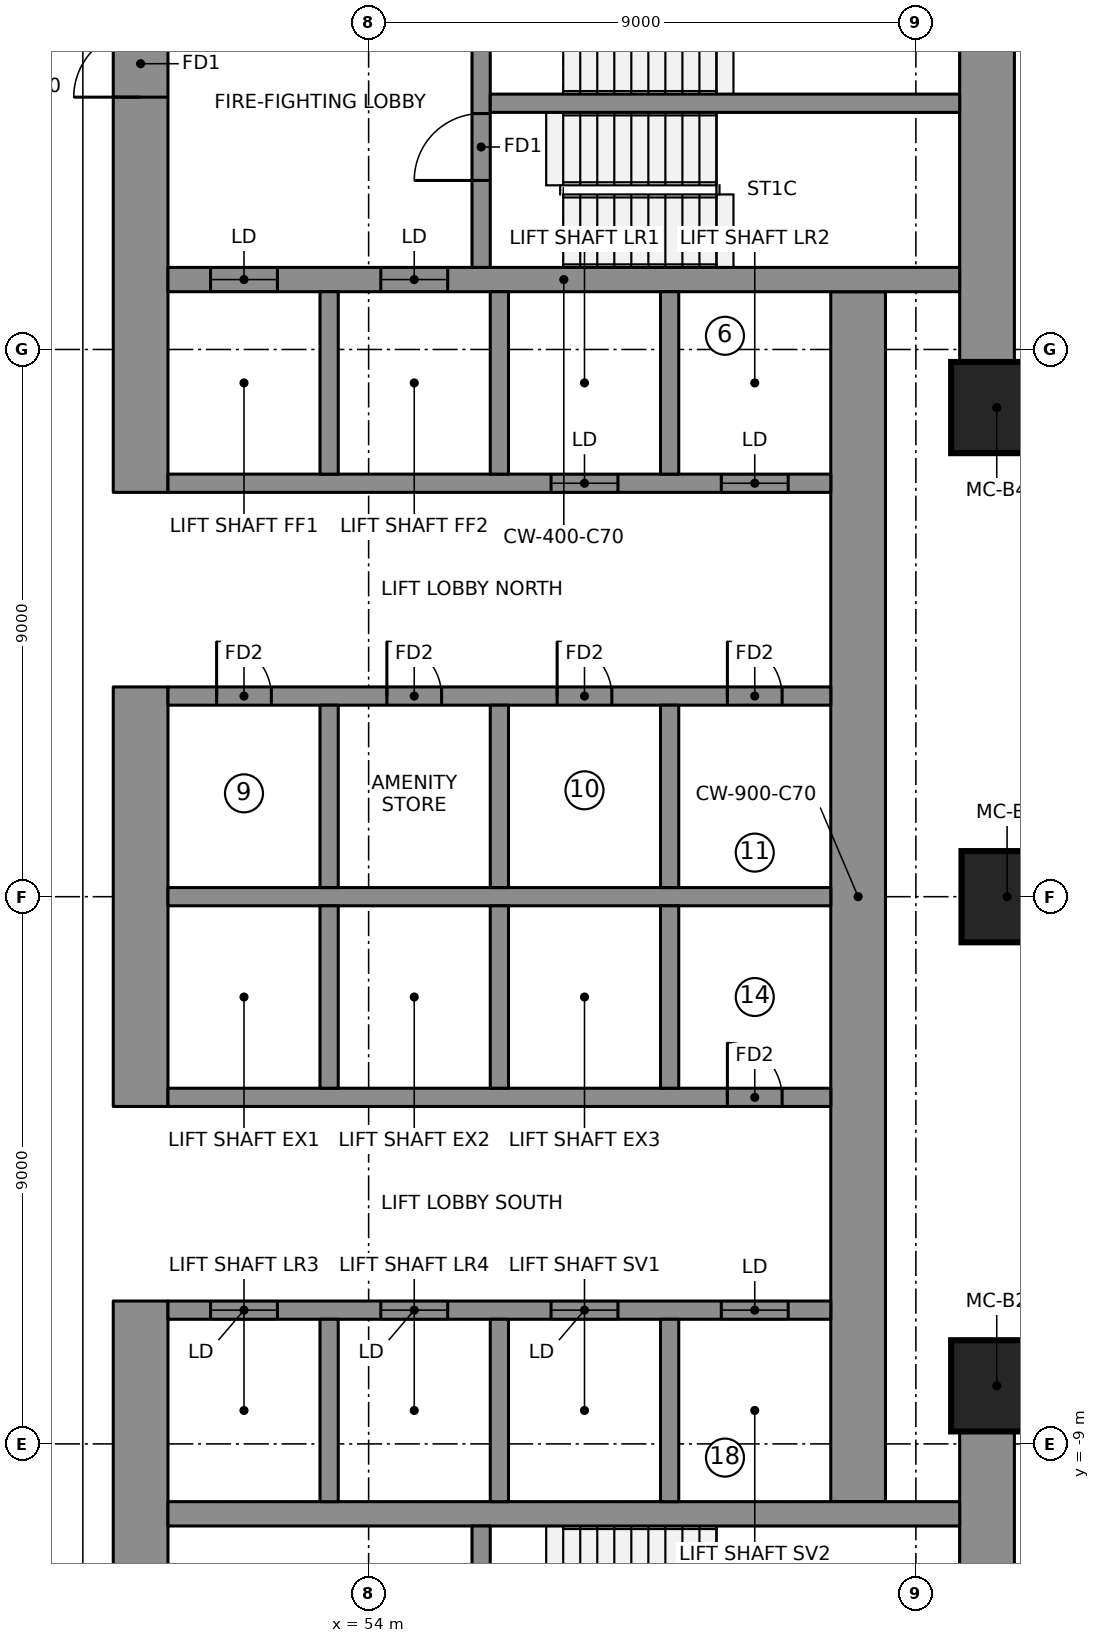
"""IFC4 building model, lengths in metres.
Left out: names, types, materials, properties, quantities, classifications, styles, units other than length and angle.
Written with IfcOpenShell. Run it as: python <this file> out.ifc"""

import sys

from ifc_helpers import new_model, si_unit, direction, frame, frame_2d, origin, origin_2d, place, context, subcontext, project, spatial, rectangle, extrude, element, fill, save


model = new_model("IFC4")
c1 = context("Model", 3, precision=1e-05, world=origin(), true_north=direction((0.0, 1.0)))
c2 = subcontext(c1, "Body", "Model", "MODEL_VIEW")
j1 = project(units=[si_unit("LENGTHUNIT", "METRE"), si_unit("PLANEANGLEUNIT", "RADIAN")], contexts=[c1])
p1 = place(None, origin())
s1 = spatial("IfcSite", under=j1, at=p1, CompositionType="ELEMENT")
p2 = place(p1, origin())
s2 = spatial("IfcBuilding", under=s1, at=p2, CompositionType="ELEMENT")
p3 = place(p2, frame((0.0, 0.0, 155.05)))
s3 = spatial("IfcBuildingStorey", under=s2, at=p3, CompositionType="ELEMENT", Elevation=155.05)
p4 = place(p3, frame((50.25, 6.65, 0.0), z_axis=(0.0, 0.0, 1.0), x_axis=(0.0, 1.0, 0.0)))
e1 = element("IfcWall", 1, at=p4, inside=s3, PredefinedType="SHEAR", context=c2, shape_type="SweptSolid", body=[
    extrude(rectangle(XDim=10.0, YDim=0.9, at=frame_2d((5.0, 0.0))), origin(), (0.0, 0.0, 1.0), 3.55),
])
p5 = place(p4, frame((6.5, 0.0, 0.0)))
e2 = element("IfcOpeningElement", 2, at=p5, cuts=e1, PredefinedType="OPENING", context=c2, shape_type="SweptSolid", body=[
    extrude(rectangle(XDim=1.1, YDim=2.1, at=frame_2d((0.55, 1.05))), frame((0.0, 0.46, 0.0), z_axis=(0.0, -1.0, 0.0), x_axis=(1.0, 0.0, 0.0)), (0.0, 0.0, 1.0), 0.92),
])
p6 = place(p3, frame((50.25, -3.45, 0.0), z_axis=(0.0, 0.0, 1.0), x_axis=(0.0, 1.0, 0.0)))
e3 = element("IfcWall", 3, at=p6, inside=s3, PredefinedType="SHEAR", context=c2, shape_type="SweptSolid", body=[
    extrude(rectangle(XDim=6.9, YDim=0.9, at=frame_2d((3.45, 0.0))), origin(), (0.0, 0.0, 1.0), 3.55),
])
p7 = place(p3, frame((50.25, -16.65, 0.0), z_axis=(0.0, 0.0, 1.0), x_axis=(0.0, 1.0, 0.0)))
e4 = element("IfcWall", 4, at=p7, inside=s3, PredefinedType="SHEAR", context=c2, shape_type="SweptSolid", body=[
    extrude(rectangle(XDim=10.0, YDim=0.9, at=frame_2d((5.0, 0.0))), origin(), (0.0, 0.0, 1.0), 3.55),
])
p8 = place(p7, frame((2.4, 0.0, 0.0)))
e5 = element("IfcOpeningElement", 5, at=p8, cuts=e4, PredefinedType="OPENING", context=c2, shape_type="SweptSolid", body=[
    extrude(rectangle(XDim=1.1, YDim=2.1, at=frame_2d((0.55, 1.05))), frame((0.0, 0.46, 0.0), z_axis=(0.0, -1.0, 0.0), x_axis=(1.0, 0.0, 0.0)), (0.0, 0.0, 1.0), 0.92),
])
for number, where, z_axis, x_axis in (
    (6, (64.17, 8.745, 0.0), (0.0, 0.0, 1.0), (0.0, 1.0, 0.0)),
    (7, (64.17, -15.75, 0.0), (0.0, 0.0, 1.0), (0.0, 1.0, 0.0)),
):
    element("IfcWall", number, at=place(p3, frame(where, z_axis=z_axis, x_axis=x_axis)), inside=s3, PredefinedType="SHEAR", context=c2, shape_type="SweptSolid", body=[
        extrude(rectangle(XDim=7.005, YDim=0.9, at=frame_2d((3.503, 0.0))), origin(), (0.0, 0.0, 1.0), 3.55),
    ])
p9 = place(p3, frame((62.05, -9.95, 0.0), z_axis=(0.0, 0.0, 1.0), x_axis=(0.0, 1.0, 0.0)))
e8 = element("IfcWall", 8, at=p9, inside=s3, PredefinedType="SHEAR", context=c2, shape_type="SweptSolid", body=[
    extrude(rectangle(XDim=19.9, YDim=0.9, at=frame_2d((9.95, 0.0))), origin(), (0.0, 0.0, 1.0), 3.55),
])
p10 = place(p3, frame((50.7, 10.15, 0.0), z_axis=(0.0, 0.0, 1.0), x_axis=(1.0, 0.0, 0.0)))
e9 = element("IfcWall", 9, at=p10, inside=s3, PredefinedType="SHEAR", context=c2, shape_type="SweptSolid", body=[
    extrude(rectangle(XDim=13.02, YDim=0.4, at=frame_2d((6.51, 0.0))), origin(), (0.0, 0.0, 1.0), 3.55),
])
p11 = place(p10, frame((0.7, 0.0, 0.0)))
e10 = element("IfcOpeningElement", 10, at=p11, cuts=e9, PredefinedType="OPENING", context=c2, shape_type="SweptSolid", body=[
    extrude(rectangle(XDim=1.1, YDim=2.1, at=frame_2d((0.55, 1.05))), frame((0.0, 0.21, 0.0), z_axis=(0.0, -1.0, 0.0), x_axis=(1.0, 0.0, 0.0)), (0.0, 0.0, 1.0), 0.42),
])
p12 = place(p10, frame((3.5, 0.0, 0.0)))
e11 = element("IfcOpeningElement", 11, at=p12, cuts=e9, PredefinedType="OPENING", context=c2, shape_type="SweptSolid", body=[
    extrude(rectangle(XDim=1.1, YDim=2.1, at=frame_2d((0.55, 1.05))), frame((0.0, 0.21, 0.0), z_axis=(0.0, -1.0, 0.0), x_axis=(1.0, 0.0, 0.0)), (0.0, 0.0, 1.0), 0.42),
])
p13 = place(p3, frame((50.7, -10.15, 0.0), z_axis=(0.0, 0.0, 1.0), x_axis=(1.0, 0.0, 0.0)))
e12 = element("IfcWall", 12, at=p13, inside=s3, PredefinedType="SHEAR", context=c2, shape_type="SweptSolid", body=[
    extrude(rectangle(XDim=13.02, YDim=0.4, at=frame_2d((6.51, 0.0))), origin(), (0.0, 0.0, 1.0), 3.55),
])
p14 = place(p3, frame((50.7, 0.0, 0.0), z_axis=(0.0, 0.0, 1.0), x_axis=(1.0, 0.0, 0.0)))
e13 = element("IfcWall", 13, at=p14, inside=s3, PredefinedType="SHEAR", context=c2, shape_type="SweptSolid", body=[
    extrude(rectangle(XDim=10.9, YDim=0.3, at=frame_2d((5.45, 0.0))), origin(), (0.0, 0.0, 1.0), 3.55),
])
p15 = place(p3, frame((50.7, 3.3, 0.0), z_axis=(0.0, 0.0, 1.0), x_axis=(1.0, 0.0, 0.0)))
e14 = element("IfcWall", 14, at=p15, inside=s3, PredefinedType="SHEAR", context=c2, shape_type="SweptSolid", body=[
    extrude(rectangle(XDim=10.9, YDim=0.3, at=frame_2d((5.45, 0.0))), origin(), (0.0, 0.0, 1.0), 3.55),
])
p16 = place(p15, frame((0.8, 0.0, 0.0)))
e15 = element("IfcOpeningElement", 15, at=p16, cuts=e14, PredefinedType="OPENING", context=c2, shape_type="SweptSolid", body=[
    extrude(rectangle(XDim=0.9, YDim=2.1, at=frame_2d((0.45, 1.05))), frame((0.0, 0.16, 0.0), z_axis=(0.0, -1.0, 0.0), x_axis=(1.0, 0.0, 0.0)), (0.0, 0.0, 1.0), 0.32),
])
p17 = place(p15, frame((3.6, 0.0, 0.0)))
e16 = element("IfcOpeningElement", 16, at=p17, cuts=e14, PredefinedType="OPENING", context=c2, shape_type="SweptSolid", body=[
    extrude(rectangle(XDim=0.9, YDim=2.1, at=frame_2d((0.45, 1.05))), frame((0.0, 0.16, 0.0), z_axis=(0.0, -1.0, 0.0), x_axis=(1.0, 0.0, 0.0)), (0.0, 0.0, 1.0), 0.32),
])
p18 = place(p15, frame((6.4, 0.0, 0.0)))
e17 = element("IfcOpeningElement", 17, at=p18, cuts=e14, PredefinedType="OPENING", context=c2, shape_type="SweptSolid", body=[
    extrude(rectangle(XDim=0.9, YDim=2.1, at=frame_2d((0.45, 1.05))), frame((0.0, 0.16, 0.0), z_axis=(0.0, -1.0, 0.0), x_axis=(1.0, 0.0, 0.0)), (0.0, 0.0, 1.0), 0.32),
])
p19 = place(p15, frame((9.2, 0.0, 0.0)))
e18 = element("IfcOpeningElement", 18, at=p19, cuts=e14, PredefinedType="OPENING", context=c2, shape_type="SweptSolid", body=[
    extrude(rectangle(XDim=0.9, YDim=2.1, at=frame_2d((0.45, 1.05))), frame((0.0, 0.16, 0.0), z_axis=(0.0, -1.0, 0.0), x_axis=(1.0, 0.0, 0.0)), (0.0, 0.0, 1.0), 0.32),
])
p20 = place(p3, frame((50.7, 6.8, 0.0), z_axis=(0.0, 0.0, 1.0), x_axis=(1.0, 0.0, 0.0)))
e19 = element("IfcWall", 19, at=p20, inside=s3, PredefinedType="SHEAR", context=c2, shape_type="SweptSolid", body=[
    extrude(rectangle(XDim=10.9, YDim=0.3, at=frame_2d((5.45, 0.0))), origin(), (0.0, 0.0, 1.0), 3.55),
])
p21 = place(p20, frame((6.3, 0.0, 0.0)))
e20 = element("IfcOpeningElement", 20, at=p21, cuts=e19, PredefinedType="OPENING", context=c2, shape_type="SweptSolid", body=[
    extrude(rectangle(XDim=1.1, YDim=2.1, at=frame_2d((0.55, 1.05))), frame((0.0, 0.16, 0.0), z_axis=(0.0, -1.0, 0.0), x_axis=(1.0, 0.0, 0.0)), (0.0, 0.0, 1.0), 0.32),
])
p22 = place(p20, frame((9.1, 0.0, 0.0)))
e21 = element("IfcOpeningElement", 21, at=p22, cuts=e19, PredefinedType="OPENING", context=c2, shape_type="SweptSolid", body=[
    extrude(rectangle(XDim=1.1, YDim=2.1, at=frame_2d((0.55, 1.05))), frame((0.0, 0.16, 0.0), z_axis=(0.0, -1.0, 0.0), x_axis=(1.0, 0.0, 0.0)), (0.0, 0.0, 1.0), 0.32),
])
for number, where, z_axis, x_axis in (
    (22, (53.35, 0.15, 0.0), (0.0, 0.0, 1.0), (0.0, 1.0, 0.0)),
    (23, (53.35, 6.95, 0.0), (0.0, 0.0, 1.0), (0.0, 1.0, 0.0)),
    (24, (56.15, 0.15, 0.0), (0.0, 0.0, 1.0), (0.0, 1.0, 0.0)),
    (25, (56.15, 6.95, 0.0), (0.0, 0.0, 1.0), (0.0, 1.0, 0.0)),
    (26, (58.95, 0.15, 0.0), (0.0, 0.0, 1.0), (0.0, 1.0, 0.0)),
    (27, (58.95, 6.95, 0.0), (0.0, 0.0, 1.0), (0.0, 1.0, 0.0)),
):
    element("IfcWall", number, at=place(p3, frame(where, z_axis=z_axis, x_axis=x_axis)), inside=s3, PredefinedType="SHEAR", context=c2, shape_type="SweptSolid", body=[
        extrude(rectangle(XDim=3.0, YDim=0.3, at=frame_2d((1.5, 0.0))), origin(), (0.0, 0.0, 1.0), 3.55),
    ])
p23 = place(p3, frame((50.7, -3.3, 0.0), z_axis=(0.0, 0.0, 1.0), x_axis=(1.0, 0.0, 0.0)))
e28 = element("IfcWall", 28, at=p23, inside=s3, PredefinedType="SHEAR", context=c2, shape_type="SweptSolid", body=[
    extrude(rectangle(XDim=10.9, YDim=0.3, at=frame_2d((5.45, 0.0))), origin(), (0.0, 0.0, 1.0), 3.55),
])
p24 = place(p23, frame((9.2, 0.0, 0.0)))
e29 = element("IfcOpeningElement", 29, at=p24, cuts=e28, PredefinedType="OPENING", context=c2, shape_type="SweptSolid", body=[
    extrude(rectangle(XDim=0.9, YDim=2.1, at=frame_2d((0.45, 1.05))), frame((0.0, 0.16, 0.0), z_axis=(0.0, -1.0, 0.0), x_axis=(1.0, 0.0, 0.0)), (0.0, 0.0, 1.0), 0.32),
])
p25 = place(p3, frame((50.7, -6.8, 0.0), z_axis=(0.0, 0.0, 1.0), x_axis=(1.0, 0.0, 0.0)))
e30 = element("IfcWall", 30, at=p25, inside=s3, PredefinedType="SHEAR", context=c2, shape_type="SweptSolid", body=[
    extrude(rectangle(XDim=10.9, YDim=0.3, at=frame_2d((5.45, 0.0))), origin(), (0.0, 0.0, 1.0), 3.55),
])
p26 = place(p25, frame((0.7, 0.0, 0.0)))
e31 = element("IfcOpeningElement", 31, at=p26, cuts=e30, PredefinedType="OPENING", context=c2, shape_type="SweptSolid", body=[
    extrude(rectangle(XDim=1.1, YDim=2.1, at=frame_2d((0.55, 1.05))), frame((0.0, 0.16, 0.0), z_axis=(0.0, -1.0, 0.0), x_axis=(1.0, 0.0, 0.0)), (0.0, 0.0, 1.0), 0.32),
])
p27 = place(p25, frame((3.5, 0.0, 0.0)))
e32 = element("IfcOpeningElement", 32, at=p27, cuts=e30, PredefinedType="OPENING", context=c2, shape_type="SweptSolid", body=[
    extrude(rectangle(XDim=1.1, YDim=2.1, at=frame_2d((0.55, 1.05))), frame((0.0, 0.16, 0.0), z_axis=(0.0, -1.0, 0.0), x_axis=(1.0, 0.0, 0.0)), (0.0, 0.0, 1.0), 0.32),
])
p28 = place(p25, frame((6.3, 0.0, 0.0)))
e33 = element("IfcOpeningElement", 33, at=p28, cuts=e30, PredefinedType="OPENING", context=c2, shape_type="SweptSolid", body=[
    extrude(rectangle(XDim=1.1, YDim=2.1, at=frame_2d((0.55, 1.05))), frame((0.0, 0.16, 0.0), z_axis=(0.0, -1.0, 0.0), x_axis=(1.0, 0.0, 0.0)), (0.0, 0.0, 1.0), 0.32),
])
p29 = place(p25, frame((9.1, 0.0, 0.0)))
e34 = element("IfcOpeningElement", 34, at=p29, cuts=e30, PredefinedType="OPENING", context=c2, shape_type="SweptSolid", body=[
    extrude(rectangle(XDim=1.1, YDim=2.1, at=frame_2d((0.55, 1.05))), frame((0.0, 0.16, 0.0), z_axis=(0.0, -1.0, 0.0), x_axis=(1.0, 0.0, 0.0)), (0.0, 0.0, 1.0), 0.32),
])
for number, where, z_axis, x_axis in (
    (35, (53.35, -3.15, 0.0), (0.0, 0.0, 1.0), (0.0, 1.0, 0.0)),
    (36, (53.35, -9.95, 0.0), (0.0, 0.0, 1.0), (0.0, 1.0, 0.0)),
    (37, (56.15, -3.15, 0.0), (0.0, 0.0, 1.0), (0.0, 1.0, 0.0)),
    (38, (56.15, -9.95, 0.0), (0.0, 0.0, 1.0), (0.0, 1.0, 0.0)),
    (39, (58.95, -3.15, 0.0), (0.0, 0.0, 1.0), (0.0, 1.0, 0.0)),
    (40, (58.95, -9.95, 0.0), (0.0, 0.0, 1.0), (0.0, 1.0, 0.0)),
):
    element("IfcWall", number, at=place(p3, frame(where, z_axis=z_axis, x_axis=x_axis)), inside=s3, PredefinedType="SHEAR", context=c2, shape_type="SweptSolid", body=[
        extrude(rectangle(XDim=3.0, YDim=0.3, at=frame_2d((1.5, 0.0))), origin(), (0.0, 0.0, 1.0), 3.55),
    ])
p30 = place(p3, frame((55.85, 10.35, 0.0), z_axis=(0.0, 0.0, 1.0), x_axis=(0.0, 1.0, 0.0)))
e41 = element("IfcWall", 41, at=p30, inside=s3, PredefinedType="SHEAR", context=c2, shape_type="SweptSolid", body=[
    extrude(rectangle(XDim=5.4, YDim=0.3, at=frame_2d((2.7, 0.0))), origin(), (0.0, 0.0, 1.0), 3.55),
])
p31 = place(p30, frame((1.43, 0.0, 0.0)))
e42 = element("IfcOpeningElement", 42, at=p31, cuts=e41, PredefinedType="OPENING", context=c2, shape_type="SweptSolid", body=[
    extrude(rectangle(XDim=1.1, YDim=2.1, at=frame_2d((0.55, 1.05))), frame((0.0, 0.16, 0.0), z_axis=(0.0, -1.0, 0.0), x_axis=(1.0, 0.0, 0.0)), (0.0, 0.0, 1.0), 0.32),
])
p32 = place(p30, frame((3.6, 0.0, 0.0)))
e43 = element("IfcOpeningElement", 43, at=p32, cuts=e41, PredefinedType="OPENING", context=c2, shape_type="SweptSolid", body=[
    extrude(rectangle(XDim=1.1, YDim=2.1, at=frame_2d((0.55, 1.05))), frame((0.0, 0.16, 0.0), z_axis=(0.0, -1.0, 0.0), x_axis=(1.0, 0.0, 0.0)), (0.0, 0.0, 1.0), 0.32),
])
p33 = place(p3, frame((55.85, -15.75, 0.0), z_axis=(0.0, 0.0, 1.0), x_axis=(0.0, 1.0, 0.0)))
e44 = element("IfcWall", 44, at=p33, inside=s3, PredefinedType="SHEAR", context=c2, shape_type="SweptSolid", body=[
    extrude(rectangle(XDim=5.4, YDim=0.3, at=frame_2d((2.7, 0.0))), origin(), (0.0, 0.0, 1.0), 3.55),
])
p34 = place(p33, frame((3.6, 0.0, 0.0)))
e45 = element("IfcOpeningElement", 45, at=p34, cuts=e44, PredefinedType="OPENING", context=c2, shape_type="SweptSolid", body=[
    extrude(rectangle(XDim=1.1, YDim=2.1, at=frame_2d((0.55, 1.05))), frame((0.0, 0.16, 0.0), z_axis=(0.0, -1.0, 0.0), x_axis=(1.0, 0.0, 0.0)), (0.0, 0.0, 1.0), 0.32),
])
p35 = place(p33, frame((0.8, 0.0, 0.0)))
e46 = element("IfcOpeningElement", 46, at=p35, cuts=e44, PredefinedType="OPENING", context=c2, shape_type="SweptSolid", body=[
    extrude(rectangle(XDim=0.9, YDim=2.1, at=frame_2d((0.45, 1.05))), frame((0.0, 0.16, 0.0), z_axis=(0.0, -1.0, 0.0), x_axis=(1.0, 0.0, 0.0)), (0.0, 0.0, 1.0), 0.32),
])
p36 = place(p3, frame((56.0, 13.05, 0.0), z_axis=(0.0, 0.0, 1.0), x_axis=(1.0, 0.0, 0.0)))
e47 = element("IfcWall", 47, at=p36, inside=s3, PredefinedType="SHEAR", context=c2, shape_type="SweptSolid", body=[
    extrude(rectangle(XDim=7.72, YDim=0.3, at=frame_2d((3.86, 0.0))), origin(), (0.0, 0.0, 1.0), 3.55),
])
for number, where, z_axis, x_axis in (
    (48, (64.33, -8.045, 0.0), (0.0, 0.0, 1.0), (1.0, 0.0, 0.0)),
    (49, (64.5, 0.0, 0.0), (0.0, 0.0, 1.0), (1.0, 0.0, 0.0)),
    (50, (64.33, 8.045, 0.0), (0.0, 0.0, 1.0), (1.0, 0.0, 0.0)),
):
    element("IfcColumn", number, at=place(p3, frame(where, z_axis=z_axis, x_axis=x_axis)), inside=s3, PredefinedType="COLUMN", context=c2, shape_type="SweptSolid", body=[
        extrude(rectangle(XDim=1.5, YDim=1.5, at=origin_2d()), origin(), (0.0, 0.0, 1.0), 3.55),
    ])
p37 = place(p11, origin())
e51 = element("IfcDoor", 51, at=p37, inside=s3, OperationType="DOUBLE_DOOR_SLIDING", PredefinedType="DOOR", context=c2, shape_type="SweptSolid", body=[
    extrude(rectangle(XDim=1.1, YDim=2.1, at=frame_2d((0.55, 1.05))), frame((0.0, 0.025, 0.0), z_axis=(0.0, -1.0, 0.0), x_axis=(1.0, 0.0, 0.0)), (0.0, 0.0, 1.0), 0.05),
])
fill(e10, e51)
p38 = place(p12, origin())
e52 = element("IfcDoor", 52, at=p38, inside=s3, OperationType="DOUBLE_DOOR_SLIDING", PredefinedType="DOOR", context=c2, shape_type="SweptSolid", body=[
    extrude(rectangle(XDim=1.1, YDim=2.1, at=frame_2d((0.55, 1.05))), frame((0.0, 0.025, 0.0), z_axis=(0.0, -1.0, 0.0), x_axis=(1.0, 0.0, 0.0)), (0.0, 0.0, 1.0), 0.05),
])
fill(e11, e52)
p39 = place(p21, origin())
e53 = element("IfcDoor", 53, at=p39, inside=s3, OperationType="DOUBLE_DOOR_SLIDING", PredefinedType="DOOR", context=c2, shape_type="SweptSolid", body=[
    extrude(rectangle(XDim=1.1, YDim=2.1, at=frame_2d((0.55, 1.05))), frame((0.0, 0.025, 0.0), z_axis=(0.0, -1.0, 0.0), x_axis=(1.0, 0.0, 0.0)), (0.0, 0.0, 1.0), 0.05),
])
fill(e20, e53)
p40 = place(p22, origin())
e54 = element("IfcDoor", 54, at=p40, inside=s3, OperationType="DOUBLE_DOOR_SLIDING", PredefinedType="DOOR", context=c2, shape_type="SweptSolid", body=[
    extrude(rectangle(XDim=1.1, YDim=2.1, at=frame_2d((0.55, 1.05))), frame((0.0, 0.025, 0.0), z_axis=(0.0, -1.0, 0.0), x_axis=(1.0, 0.0, 0.0)), (0.0, 0.0, 1.0), 0.05),
])
fill(e21, e54)
p41 = place(p26, origin())
e55 = element("IfcDoor", 55, at=p41, inside=s3, OperationType="DOUBLE_DOOR_SLIDING", PredefinedType="DOOR", context=c2, shape_type="SweptSolid", body=[
    extrude(rectangle(XDim=1.1, YDim=2.1, at=frame_2d((0.55, 1.05))), frame((0.0, 0.025, 0.0), z_axis=(0.0, -1.0, 0.0), x_axis=(1.0, 0.0, 0.0)), (0.0, 0.0, 1.0), 0.05),
])
fill(e31, e55)
p42 = place(p27, origin())
e56 = element("IfcDoor", 56, at=p42, inside=s3, OperationType="DOUBLE_DOOR_SLIDING", PredefinedType="DOOR", context=c2, shape_type="SweptSolid", body=[
    extrude(rectangle(XDim=1.1, YDim=2.1, at=frame_2d((0.55, 1.05))), frame((0.0, 0.025, 0.0), z_axis=(0.0, -1.0, 0.0), x_axis=(1.0, 0.0, 0.0)), (0.0, 0.0, 1.0), 0.05),
])
fill(e32, e56)
p43 = place(p28, origin())
e57 = element("IfcDoor", 57, at=p43, inside=s3, OperationType="DOUBLE_DOOR_SLIDING", PredefinedType="DOOR", context=c2, shape_type="SweptSolid", body=[
    extrude(rectangle(XDim=1.1, YDim=2.1, at=frame_2d((0.55, 1.05))), frame((0.0, 0.025, 0.0), z_axis=(0.0, -1.0, 0.0), x_axis=(1.0, 0.0, 0.0)), (0.0, 0.0, 1.0), 0.05),
])
fill(e33, e57)
p44 = place(p29, origin())
e58 = element("IfcDoor", 58, at=p44, inside=s3, OperationType="DOUBLE_DOOR_SLIDING", PredefinedType="DOOR", context=c2, shape_type="SweptSolid", body=[
    extrude(rectangle(XDim=1.1, YDim=2.1, at=frame_2d((0.55, 1.05))), frame((0.0, 0.025, 0.0), z_axis=(0.0, -1.0, 0.0), x_axis=(1.0, 0.0, 0.0)), (0.0, 0.0, 1.0), 0.05),
])
fill(e34, e58)
p45 = place(p31, origin())
e59 = element("IfcDoor", 59, at=p45, inside=s3, OperationType="SINGLE_SWING_RIGHT", PredefinedType="DOOR", context=c2, shape_type="SweptSolid", body=[
    extrude(rectangle(XDim=1.1, YDim=2.1, at=frame_2d((0.55, 1.05))), frame((0.0, 0.025, 0.0), z_axis=(0.0, -1.0, 0.0), x_axis=(1.0, 0.0, 0.0)), (0.0, 0.0, 1.0), 0.05),
])
fill(e42, e59)
p46 = place(p5, origin())
e60 = element("IfcDoor", 60, at=p46, inside=s3, OperationType="SINGLE_SWING_RIGHT", PredefinedType="DOOR", context=c2, shape_type="SweptSolid", body=[
    extrude(rectangle(XDim=1.1, YDim=2.1, at=frame_2d((0.55, 1.05))), frame((0.0, 0.025, 0.0), z_axis=(0.0, -1.0, 0.0), x_axis=(1.0, 0.0, 0.0)), (0.0, 0.0, 1.0), 0.05),
])
fill(e2, e60)
p47 = place(p16, origin())
e61 = element("IfcDoor", 61, at=p47, inside=s3, OperationType="SINGLE_SWING_LEFT", PredefinedType="DOOR", context=c2, shape_type="SweptSolid", body=[
    extrude(rectangle(XDim=0.9, YDim=2.1, at=frame_2d((0.45, 1.05))), frame((0.0, 0.025, 0.0), z_axis=(0.0, -1.0, 0.0), x_axis=(1.0, 0.0, 0.0)), (0.0, 0.0, 1.0), 0.05),
])
fill(e15, e61)
p48 = place(p17, origin())
e62 = element("IfcDoor", 62, at=p48, inside=s3, OperationType="SINGLE_SWING_LEFT", PredefinedType="DOOR", context=c2, shape_type="SweptSolid", body=[
    extrude(rectangle(XDim=0.9, YDim=2.1, at=frame_2d((0.45, 1.05))), frame((0.0, 0.025, 0.0), z_axis=(0.0, -1.0, 0.0), x_axis=(1.0, 0.0, 0.0)), (0.0, 0.0, 1.0), 0.05),
])
fill(e16, e62)
p49 = place(p18, origin())
e63 = element("IfcDoor", 63, at=p49, inside=s3, OperationType="SINGLE_SWING_LEFT", PredefinedType="DOOR", context=c2, shape_type="SweptSolid", body=[
    extrude(rectangle(XDim=0.9, YDim=2.1, at=frame_2d((0.45, 1.05))), frame((0.0, 0.025, 0.0), z_axis=(0.0, -1.0, 0.0), x_axis=(1.0, 0.0, 0.0)), (0.0, 0.0, 1.0), 0.05),
])
fill(e17, e63)
p50 = place(p19, origin())
e64 = element("IfcDoor", 64, at=p50, inside=s3, OperationType="SINGLE_SWING_LEFT", PredefinedType="DOOR", context=c2, shape_type="SweptSolid", body=[
    extrude(rectangle(XDim=0.9, YDim=2.1, at=frame_2d((0.45, 1.05))), frame((0.0, 0.025, 0.0), z_axis=(0.0, -1.0, 0.0), x_axis=(1.0, 0.0, 0.0)), (0.0, 0.0, 1.0), 0.05),
])
fill(e18, e64)
p51 = place(p24, origin())
e65 = element("IfcDoor", 65, at=p51, inside=s3, OperationType="SINGLE_SWING_LEFT", PredefinedType="DOOR", context=c2, shape_type="SweptSolid", body=[
    extrude(rectangle(XDim=0.9, YDim=2.1, at=frame_2d((0.45, 1.05))), frame((0.0, 0.025, 0.0), z_axis=(0.0, -1.0, 0.0), x_axis=(1.0, 0.0, 0.0)), (0.0, 0.0, 1.0), 0.05),
])
fill(e29, e65)
save(model, sys.argv[1])
